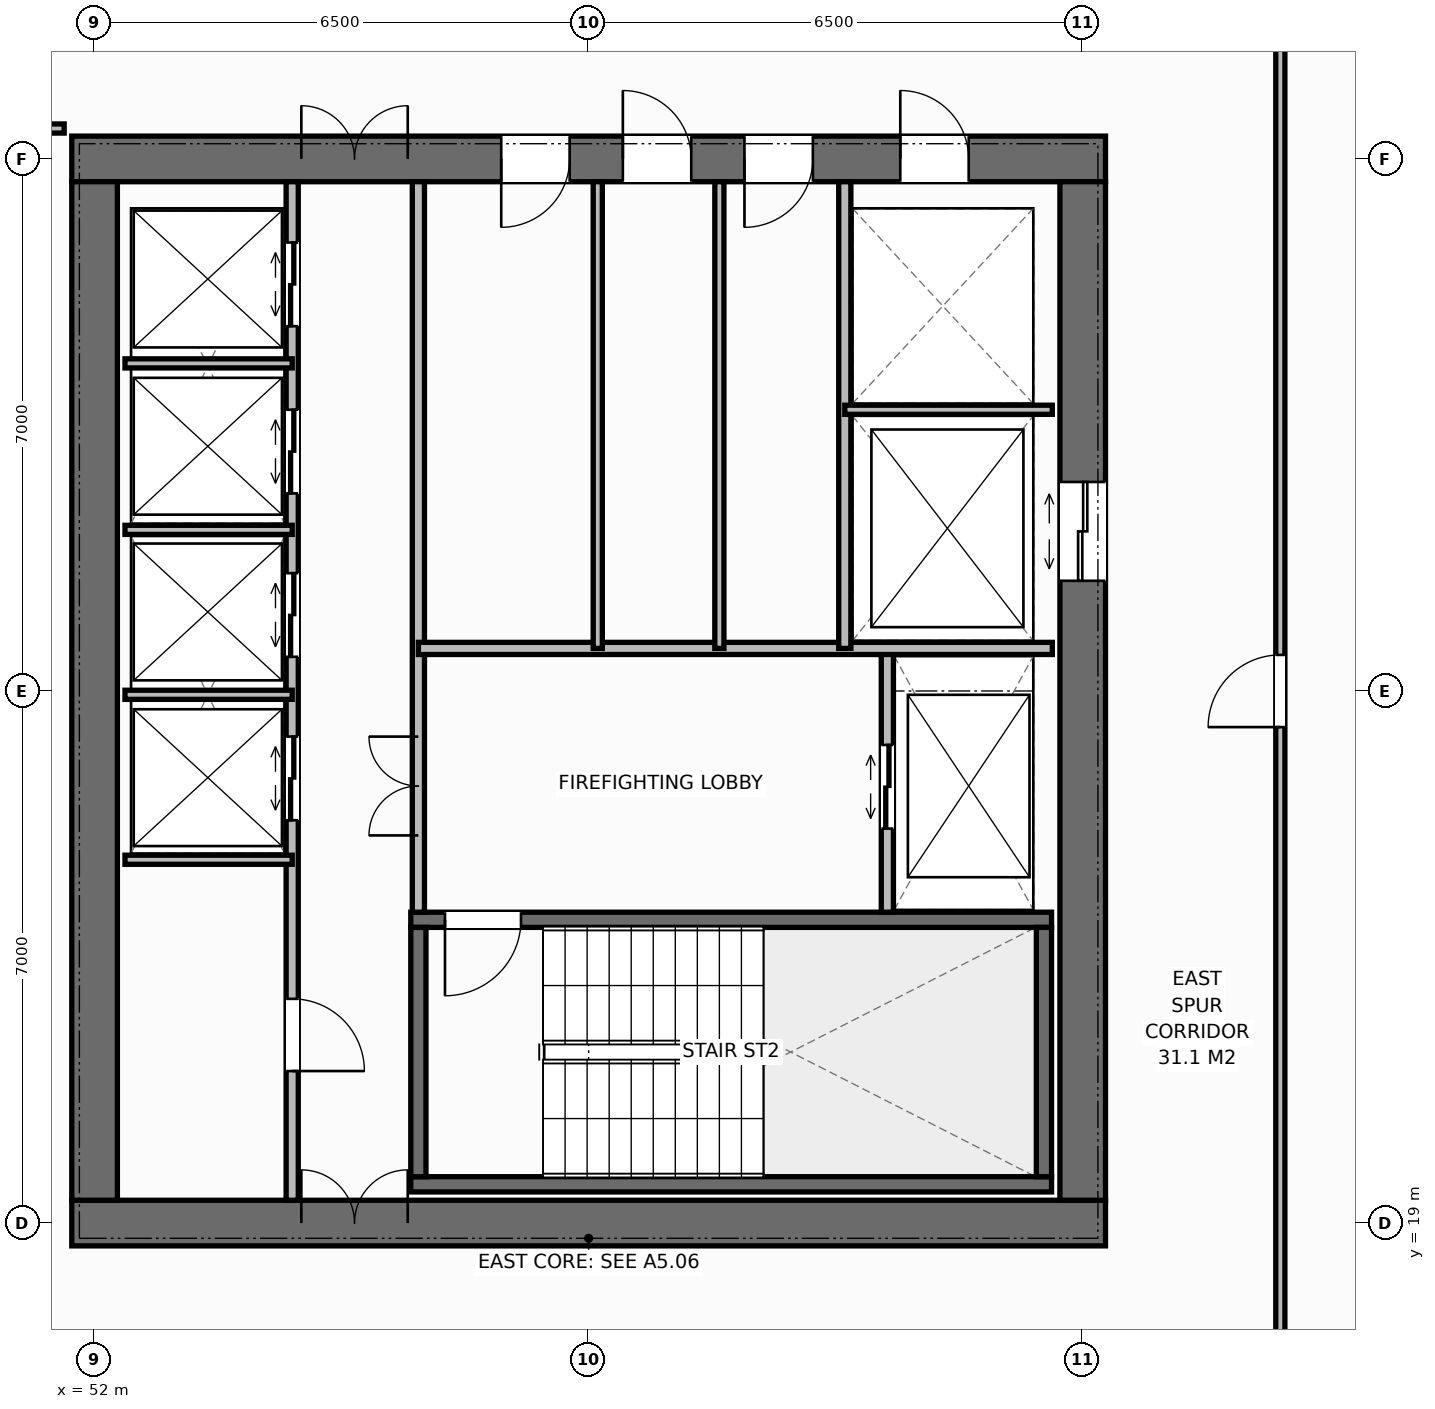
"""IFC4 building model, lengths in metres.
Left out: names, types, materials, properties, quantities, classifications, styles, units other than length and angle.
Written with IfcOpenShell. Run it as: python <this file> out.ifc"""

import sys

from ifc_helpers import new_model, si_unit, direction, frame, frame_2d, origin, place, context, subcontext, project, spatial, rectangle, extrude, element, fill, save


model = new_model("IFC4")
c1 = context("Model", 3, precision=1e-05, world=origin(), true_north=direction((0.0, 1.0)))
c2 = subcontext(c1, "Body", "Model", "MODEL_VIEW")
j1 = project(units=[si_unit("LENGTHUNIT", "METRE"), si_unit("PLANEANGLEUNIT", "RADIAN")], contexts=[c1])
p1 = place(None, origin())
s1 = spatial("IfcSite", under=j1, at=p1, CompositionType="ELEMENT")
p2 = place(p1, origin())
s2 = spatial("IfcBuilding", under=s1, at=p2, CompositionType="ELEMENT")
p3 = place(p2, frame((0.0, 0.0, 144.2)))
s3 = spatial("IfcBuildingStorey", under=s2, at=p3, CompositionType="ELEMENT", Elevation=144.2)
p4 = place(p3, frame((51.7, 19.0, 0.0), z_axis=(0.0, 0.0, 1.0), x_axis=(1.0, 0.0, 0.0)))
e1 = element("IfcWall", 1, at=p4, inside=s3, PredefinedType="SHEAR", context=c2, shape_type="SweptSolid", body=[
    extrude(rectangle(XDim=13.6, YDim=0.6, at=frame_2d((6.8, 0.0))), origin(), (0.0, 0.0, 1.0), 3.8),
])
p5 = place(p4, frame((3.02, 0.0, 0.0)))
e2 = element("IfcOpeningElement", 2, at=p5, cuts=e1, PredefinedType="OPENING", context=c2, shape_type="SweptSolid", body=[
    extrude(rectangle(XDim=1.4, YDim=2.2, at=frame_2d((0.7, 1.1))), frame((0.0, 0.31, 0.0), z_axis=(0.0, -1.0, 0.0), x_axis=(1.0, 0.0, 0.0)), (0.0, 0.0, 1.0), 0.62),
])
p6 = place(p3, frame((51.7, 33.0, 0.0), z_axis=(0.0, 0.0, 1.0), x_axis=(1.0, 0.0, 0.0)))
e3 = element("IfcWall", 3, at=p6, inside=s3, PredefinedType="SHEAR", context=c2, shape_type="SweptSolid", body=[
    extrude(rectangle(XDim=13.6, YDim=0.6, at=frame_2d((6.8, 0.0))), origin(), (0.0, 0.0, 1.0), 3.8),
])
p7 = place(p6, frame((3.02, 0.0, 0.0)))
e4 = element("IfcOpeningElement", 4, at=p7, cuts=e3, PredefinedType="OPENING", context=c2, shape_type="SweptSolid", body=[
    extrude(rectangle(XDim=1.4, YDim=2.2, at=frame_2d((0.7, 1.1))), frame((0.0, 0.31, 0.0), z_axis=(0.0, -1.0, 0.0), x_axis=(1.0, 0.0, 0.0)), (0.0, 0.0, 1.0), 0.62),
])
p8 = place(p6, frame((10.9, 0.0, 0.0)))
e5 = element("IfcOpeningElement", 5, at=p8, cuts=e3, PredefinedType="OPENING", context=c2, shape_type="SweptSolid", body=[
    extrude(rectangle(XDim=0.9, YDim=2.15, at=frame_2d((0.45, 1.075))), frame((0.0, 0.31, 0.0), z_axis=(0.0, -1.0, 0.0), x_axis=(1.0, 0.0, 0.0)), (0.0, 0.0, 1.0), 0.62),
])
p9 = place(p6, frame((5.65, 0.0, 0.0)))
e6 = element("IfcOpeningElement", 6, at=p9, cuts=e3, PredefinedType="OPENING", context=c2, shape_type="SweptSolid", body=[
    extrude(rectangle(XDim=0.9, YDim=2.15, at=frame_2d((0.45, 1.075))), frame((0.0, 0.31, 0.0), z_axis=(0.0, -1.0, 0.0), x_axis=(1.0, 0.0, 0.0)), (0.0, 0.0, 1.0), 0.62),
])
p10 = place(p6, frame((7.25, 0.0, 0.0)))
e7 = element("IfcOpeningElement", 7, at=p10, cuts=e3, PredefinedType="OPENING", context=c2, shape_type="SweptSolid", body=[
    extrude(rectangle(XDim=0.9, YDim=2.15, at=frame_2d((0.45, 1.075))), frame((0.0, 0.31, 0.0), z_axis=(0.0, -1.0, 0.0), x_axis=(1.0, 0.0, 0.0)), (0.0, 0.0, 1.0), 0.62),
])
p11 = place(p6, frame((8.85, 0.0, 0.0)))
e8 = element("IfcOpeningElement", 8, at=p11, cuts=e3, PredefinedType="OPENING", context=c2, shape_type="SweptSolid", body=[
    extrude(rectangle(XDim=0.9, YDim=2.15, at=frame_2d((0.45, 1.075))), frame((0.0, 0.31, 0.0), z_axis=(0.0, -1.0, 0.0), x_axis=(1.0, 0.0, 0.0)), (0.0, 0.0, 1.0), 0.62),
])
p12 = place(p3, frame((52.0, 19.3, 0.0), z_axis=(0.0, 0.0, 1.0), x_axis=(0.0, 1.0, 0.0)))
e9 = element("IfcWall", 9, at=p12, inside=s3, PredefinedType="SHEAR", context=c2, shape_type="SweptSolid", body=[
    extrude(rectangle(XDim=13.4, YDim=0.6, at=frame_2d((6.7, 0.0))), origin(), (0.0, 0.0, 1.0), 3.8),
])
p13 = place(p3, frame((65.0, 19.3, 0.0), z_axis=(0.0, 0.0, 1.0), x_axis=(0.0, 1.0, 0.0)))
e10 = element("IfcWall", 10, at=p13, inside=s3, PredefinedType="SHEAR", context=c2, shape_type="SweptSolid", body=[
    extrude(rectangle(XDim=13.4, YDim=0.6, at=frame_2d((6.7, 0.0))), origin(), (0.0, 0.0, 1.0), 3.8),
])
p14 = place(p13, frame((8.15, 0.0, 0.0)))
e11 = element("IfcOpeningElement", 11, at=p14, cuts=e10, PredefinedType="OPENING", context=c2, shape_type="SweptSolid", body=[
    extrude(rectangle(XDim=1.3, YDim=2.2, at=frame_2d((0.65, 1.1))), frame((0.0, 0.31, 0.0), z_axis=(0.0, -1.0, 0.0), x_axis=(1.0, 0.0, 0.0)), (0.0, 0.0, 1.0), 0.62),
])
p15 = place(p3, frame((56.16, 19.51, 0.0), z_axis=(0.0, 0.0, 1.0), x_axis=(1.0, 0.0, 0.0)))
e12 = element("IfcWall", 12, at=p15, inside=s3, PredefinedType="SHEAR", context=c2, shape_type="SweptSolid", body=[
    extrude(rectangle(XDim=8.43, YDim=0.2, at=frame_2d((4.215, 0.0))), origin(), (0.0, 0.0, 1.0), 3.8),
])
p16 = place(p3, frame((56.16, 22.99, 0.0), z_axis=(0.0, 0.0, 1.0), x_axis=(1.0, 0.0, 0.0)))
e13 = element("IfcWall", 13, at=p16, inside=s3, PredefinedType="SHEAR", context=c2, shape_type="SweptSolid", body=[
    extrude(rectangle(XDim=8.43, YDim=0.2, at=frame_2d((4.215, 0.0))), origin(), (0.0, 0.0, 1.0), 3.8),
])
p17 = place(p16, frame((0.45, 0.0, 0.0)))
e14 = element("IfcOpeningElement", 14, at=p17, cuts=e13, PredefinedType="OPENING", context=c2, shape_type="SweptSolid", body=[
    extrude(rectangle(XDim=1.0, YDim=2.15, at=frame_2d((0.5, 1.075))), frame((0.0, 0.11, 0.0), z_axis=(0.0, -1.0, 0.0), x_axis=(1.0, 0.0, 0.0)), (0.0, 0.0, 1.0), 0.22),
])
for number, where, z_axis, x_axis in (
    (15, (56.26, 19.61, 0.0), (0.0, 0.0, 1.0), (0.0, 1.0, 0.0)),
    (16, (64.49, 19.61, 0.0), (0.0, 0.0, 1.0), (0.0, 1.0, 0.0)),
):
    element("IfcWall", number, at=place(p3, frame(where, z_axis=z_axis, x_axis=x_axis)), inside=s3, PredefinedType="SHEAR", context=c2, shape_type="SweptSolid", body=[
        extrude(rectangle(XDim=3.28, YDim=0.2, at=frame_2d((1.64, 0.0))), origin(), (0.0, 0.0, 1.0), 3.8),
    ])
p18 = place(p3, frame((54.6, 19.3, 0.0), z_axis=(0.0, 0.0, 1.0), x_axis=(0.0, 1.0, 0.0)))
e17 = element("IfcWall", 17, at=p18, inside=s3, PredefinedType="STANDARD", context=c2, shape_type="SweptSolid", body=[
    extrude(rectangle(XDim=13.4, YDim=0.16, at=frame_2d((6.7, 0.0))), origin(), (0.0, 0.0, 1.0), 3.572),
])
p19 = place(p18, frame((1.7, 0.0, 0.0)))
e18 = element("IfcOpeningElement", 18, at=p19, cuts=e17, PredefinedType="OPENING", context=c2, shape_type="SweptSolid", body=[
    extrude(rectangle(XDim=0.95, YDim=2.15, at=frame_2d((0.475, 1.075))), frame((0.0, 0.09, 0.0), z_axis=(0.0, -1.0, 0.0), x_axis=(1.0, 0.0, 0.0)), (0.0, 0.0, 1.0), 0.18),
])
p20 = place(p18, frame((5.0, 0.0, 0.0)))
e19 = element("IfcOpeningElement", 19, at=p20, cuts=e17, PredefinedType="OPENING", context=c2, shape_type="SweptSolid", body=[
    extrude(rectangle(XDim=1.1, YDim=2.2, at=frame_2d((0.55, 1.1))), frame((0.0, 0.09, 0.0), z_axis=(0.0, -1.0, 0.0), x_axis=(1.0, 0.0, 0.0)), (0.0, 0.0, 1.0), 0.18),
])
p21 = place(p18, frame((7.15, 0.0, 0.0)))
e20 = element("IfcOpeningElement", 20, at=p21, cuts=e17, PredefinedType="OPENING", context=c2, shape_type="SweptSolid", body=[
    extrude(rectangle(XDim=1.1, YDim=2.2, at=frame_2d((0.55, 1.1))), frame((0.0, 0.09, 0.0), z_axis=(0.0, -1.0, 0.0), x_axis=(1.0, 0.0, 0.0)), (0.0, 0.0, 1.0), 0.18),
])
p22 = place(p18, frame((9.3, 0.0, 0.0)))
e21 = element("IfcOpeningElement", 21, at=p22, cuts=e17, PredefinedType="OPENING", context=c2, shape_type="SweptSolid", body=[
    extrude(rectangle(XDim=1.1, YDim=2.2, at=frame_2d((0.55, 1.1))), frame((0.0, 0.09, 0.0), z_axis=(0.0, -1.0, 0.0), x_axis=(1.0, 0.0, 0.0)), (0.0, 0.0, 1.0), 0.18),
])
p23 = place(p18, frame((11.5, 0.0, 0.0)))
e22 = element("IfcOpeningElement", 22, at=p23, cuts=e17, PredefinedType="OPENING", context=c2, shape_type="SweptSolid", body=[
    extrude(rectangle(XDim=1.1, YDim=2.2, at=frame_2d((0.55, 1.1))), frame((0.0, 0.09, 0.0), z_axis=(0.0, -1.0, 0.0), x_axis=(1.0, 0.0, 0.0)), (0.0, 0.0, 1.0), 0.18),
])
p24 = place(p3, frame((56.26, 23.09, 0.0), z_axis=(0.0, 0.0, 1.0), x_axis=(0.0, 1.0, 0.0)))
e23 = element("IfcWall", 23, at=p24, inside=s3, PredefinedType="STANDARD", context=c2, shape_type="SweptSolid", body=[
    extrude(rectangle(XDim=9.61, YDim=0.16, at=frame_2d((4.805, 0.0))), origin(), (0.0, 0.0, 1.0), 3.572),
])
p25 = place(p24, frame((1.01, 0.0, 0.0)))
e24 = element("IfcOpeningElement", 24, at=p25, cuts=e23, PredefinedType="OPENING", context=c2, shape_type="SweptSolid", body=[
    extrude(rectangle(XDim=1.3, YDim=2.2, at=frame_2d((0.65, 1.1))), frame((0.0, 0.09, 0.0), z_axis=(0.0, -1.0, 0.0), x_axis=(1.0, 0.0, 0.0)), (0.0, 0.0, 1.0), 0.18),
])
for number, where, z_axis, x_axis in (
    (25, (52.4, 23.78, 0.0), (0.0, 0.0, 1.0), (1.0, 0.0, 0.0)),
    (26, (52.4, 25.95, 0.0), (0.0, 0.0, 1.0), (1.0, 0.0, 0.0)),
    (27, (52.4, 28.12, 0.0), (0.0, 0.0, 1.0), (1.0, 0.0, 0.0)),
    (28, (52.4, 30.31, 0.0), (0.0, 0.0, 1.0), (1.0, 0.0, 0.0)),
):
    element("IfcWall", number, at=place(p3, frame(where, z_axis=z_axis, x_axis=x_axis)), inside=s3, PredefinedType="PARTITIONING", context=c2, shape_type="SweptSolid", body=[
        extrude(rectangle(XDim=2.2, YDim=0.12, at=frame_2d((1.1, 0.0))), origin(), (0.0, 0.0, 1.0), 3.572),
    ])
p26 = place(p3, frame((62.43, 23.09, 0.0), z_axis=(0.0, 0.0, 1.0), x_axis=(0.0, 1.0, 0.0)))
e29 = element("IfcWall", 29, at=p26, inside=s3, PredefinedType="STANDARD", context=c2, shape_type="SweptSolid", body=[
    extrude(rectangle(XDim=3.47, YDim=0.16, at=frame_2d((1.735, 0.0))), origin(), (0.0, 0.0, 1.0), 3.572),
])
p27 = place(p26, frame((1.1, 0.0, 0.0)))
e30 = element("IfcOpeningElement", 30, at=p27, cuts=e29, PredefinedType="OPENING", context=c2, shape_type="SweptSolid", body=[
    extrude(rectangle(XDim=1.1, YDim=2.2, at=frame_2d((0.55, 1.1))), frame((0.0, 0.09, 0.0), z_axis=(0.0, -1.0, 0.0), x_axis=(1.0, 0.0, 0.0)), (0.0, 0.0, 1.0), 0.18),
])
p28 = place(p3, frame((56.26, 26.56, 0.0), z_axis=(0.0, 0.0, 1.0), x_axis=(1.0, 0.0, 0.0)))
e31 = element("IfcWall", 31, at=p28, inside=s3, PredefinedType="STANDARD", context=c2, shape_type="SweptSolid", body=[
    extrude(rectangle(XDim=8.34, YDim=0.16, at=frame_2d((4.17, 0.0))), origin(), (0.0, 0.0, 1.0), 3.572),
])
p29 = place(p3, frame((61.87, 26.56, 0.0), z_axis=(0.0, 0.0, 1.0), x_axis=(0.0, 1.0, 0.0)))
e32 = element("IfcWall", 32, at=p29, inside=s3, PredefinedType="STANDARD", context=c2, shape_type="SweptSolid", body=[
    extrude(rectangle(XDim=6.14, YDim=0.16, at=frame_2d((3.07, 0.0))), origin(), (0.0, 0.0, 1.0), 3.572),
])
p30 = place(p3, frame((61.87, 29.7, 0.0), z_axis=(0.0, 0.0, 1.0), x_axis=(1.0, 0.0, 0.0)))
e33 = element("IfcWall", 33, at=p30, inside=s3, PredefinedType="PARTITIONING", context=c2, shape_type="SweptSolid", body=[
    extrude(rectangle(XDim=2.73, YDim=0.12, at=frame_2d((1.365, 0.0))), origin(), (0.0, 0.0, 1.0), 3.572),
])
for number, where, z_axis, x_axis in (
    (34, (58.62, 26.56, 0.0), (0.0, 0.0, 1.0), (0.0, 1.0, 0.0)),
    (35, (60.22, 26.56, 0.0), (0.0, 0.0, 1.0), (0.0, 1.0, 0.0)),
):
    element("IfcWall", number, at=place(p3, frame(where, z_axis=z_axis, x_axis=x_axis)), inside=s3, PredefinedType="PARTITIONING", context=c2, shape_type="SweptSolid", body=[
        extrude(rectangle(XDim=6.14, YDim=0.12, at=frame_2d((3.07, 0.0))), origin(), (0.0, 0.0, 1.0), 3.572),
    ])
p31 = place(p3, frame((48.0, 33.4, 0.0), z_axis=(0.0, 0.0, 1.0), x_axis=(1.0, 0.0, 0.0)))
e36 = element("IfcWall", 36, at=p31, inside=s3, PredefinedType="PARTITIONING", context=c2, shape_type="SweptSolid", body=[
    extrude(rectangle(XDim=3.6, YDim=0.12, at=frame_2d((1.8, 0.0))), origin(), (0.0, 0.0, 1.0), 3.572),
])
p32 = place(p31, frame((1.1, 0.0, 0.0)))
e37 = element("IfcOpeningElement", 37, at=p32, cuts=e36, PredefinedType="OPENING", context=c2, shape_type="SweptSolid", body=[
    extrude(rectangle(XDim=0.95, YDim=2.15, at=frame_2d((0.475, 1.075))), frame((0.0, 0.07, 0.0), z_axis=(0.0, -1.0, 0.0), x_axis=(1.0, 0.0, 0.0)), (0.0, 0.0, 1.0), 0.14),
])
p33 = place(p3, frame((67.6, 16.5, 0.0), z_axis=(0.0, 0.0, 1.0), x_axis=(0.0, 1.0, 0.0)))
e38 = element("IfcWall", 38, at=p33, inside=s3, PredefinedType="PARTITIONING", context=c2, shape_type="SweptSolid", body=[
    extrude(rectangle(XDim=19.0, YDim=0.12, at=frame_2d((9.5, 0.0))), origin(), (0.0, 0.0, 1.0), 3.572),
])
p34 = place(p33, frame((9.025, 0.0, 0.0)))
e39 = element("IfcOpeningElement", 39, at=p34, cuts=e38, PredefinedType="OPENING", context=c2, shape_type="SweptSolid", body=[
    extrude(rectangle(XDim=0.95, YDim=2.15, at=frame_2d((0.475, 1.075))), frame((0.0, 0.07, 0.0), z_axis=(0.0, -1.0, 0.0), x_axis=(1.0, 0.0, 0.0)), (0.0, 0.0, 1.0), 0.14),
])
p35 = place(p5, origin())
e40 = element("IfcDoor", 40, at=p35, inside=s3, OperationType="DOUBLE_DOOR_SINGLE_SWING", PredefinedType="DOOR", context=c2, shape_type="SweptSolid", body=[
    extrude(rectangle(XDim=1.4, YDim=2.2, at=frame_2d((0.7, 1.1))), frame((0.0, 0.075, 0.0), z_axis=(0.0, -1.0, 0.0), x_axis=(1.0, 0.0, 0.0)), (0.0, 0.0, 1.0), 0.05),
])
fill(e2, e40)
p36 = place(p7, origin())
e41 = element("IfcDoor", 41, at=p36, inside=s3, OperationType="DOUBLE_DOOR_SINGLE_SWING", PredefinedType="DOOR", context=c2, shape_type="SweptSolid", body=[
    extrude(rectangle(XDim=1.4, YDim=2.2, at=frame_2d((0.7, 1.1))), frame((0.0, -0.025, 0.0), z_axis=(0.0, -1.0, 0.0), x_axis=(1.0, 0.0, 0.0)), (0.0, 0.0, 1.0), 0.05),
])
fill(e4, e41)
p37 = place(p19, origin())
e42 = element("IfcDoor", 42, at=p37, inside=s3, OperationType="SINGLE_SWING_RIGHT", PredefinedType="DOOR", context=c2, shape_type="SweptSolid", body=[
    extrude(rectangle(XDim=0.95, YDim=2.15, at=frame_2d((0.475, 1.075))), frame((0.0, 0.025, 0.0), z_axis=(0.0, -1.0, 0.0), x_axis=(1.0, 0.0, 0.0)), (0.0, 0.0, 1.0), 0.05),
])
fill(e18, e42)
p38 = place(p20, origin())
e43 = element("IfcDoor", 43, at=p38, inside=s3, OperationType="DOUBLE_DOOR_SLIDING", PredefinedType="DOOR", context=c2, shape_type="SweptSolid", body=[
    extrude(rectangle(XDim=1.1, YDim=2.2, at=frame_2d((0.55, 1.1))), frame((0.0, 0.025, 0.0), z_axis=(0.0, -1.0, 0.0), x_axis=(1.0, 0.0, 0.0)), (0.0, 0.0, 1.0), 0.05),
])
fill(e19, e43)
p39 = place(p21, origin())
e44 = element("IfcDoor", 44, at=p39, inside=s3, OperationType="DOUBLE_DOOR_SLIDING", PredefinedType="DOOR", context=c2, shape_type="SweptSolid", body=[
    extrude(rectangle(XDim=1.1, YDim=2.2, at=frame_2d((0.55, 1.1))), frame((0.0, 0.025, 0.0), z_axis=(0.0, -1.0, 0.0), x_axis=(1.0, 0.0, 0.0)), (0.0, 0.0, 1.0), 0.05),
])
fill(e20, e44)
p40 = place(p22, origin())
e45 = element("IfcDoor", 45, at=p40, inside=s3, OperationType="DOUBLE_DOOR_SLIDING", PredefinedType="DOOR", context=c2, shape_type="SweptSolid", body=[
    extrude(rectangle(XDim=1.1, YDim=2.2, at=frame_2d((0.55, 1.1))), frame((0.0, 0.025, 0.0), z_axis=(0.0, -1.0, 0.0), x_axis=(1.0, 0.0, 0.0)), (0.0, 0.0, 1.0), 0.05),
])
fill(e21, e45)
p41 = place(p23, origin())
e46 = element("IfcDoor", 46, at=p41, inside=s3, OperationType="DOUBLE_DOOR_SLIDING", PredefinedType="DOOR", context=c2, shape_type="SweptSolid", body=[
    extrude(rectangle(XDim=1.1, YDim=2.2, at=frame_2d((0.55, 1.1))), frame((0.0, 0.025, 0.0), z_axis=(0.0, -1.0, 0.0), x_axis=(1.0, 0.0, 0.0)), (0.0, 0.0, 1.0), 0.05),
])
fill(e22, e46)
p42 = place(p17, origin())
e47 = element("IfcDoor", 47, at=p42, inside=s3, OperationType="SINGLE_SWING_RIGHT", PredefinedType="DOOR", context=c2, shape_type="SweptSolid", body=[
    extrude(rectangle(XDim=1.0, YDim=2.15, at=frame_2d((0.5, 1.075))), frame((0.0, 0.025, 0.0), z_axis=(0.0, -1.0, 0.0), x_axis=(1.0, 0.0, 0.0)), (0.0, 0.0, 1.0), 0.05),
])
fill(e14, e47)
p43 = place(p27, origin())
e48 = element("IfcDoor", 48, at=p43, inside=s3, OperationType="DOUBLE_DOOR_SLIDING", PredefinedType="DOOR", context=c2, shape_type="SweptSolid", body=[
    extrude(rectangle(XDim=1.1, YDim=2.2, at=frame_2d((0.55, 1.1))), frame((0.0, 0.025, 0.0), z_axis=(0.0, -1.0, 0.0), x_axis=(1.0, 0.0, 0.0)), (0.0, 0.0, 1.0), 0.05),
])
fill(e30, e48)
p44 = place(p25, origin())
e49 = element("IfcDoor", 49, at=p44, inside=s3, OperationType="DOUBLE_DOOR_SINGLE_SWING", PredefinedType="DOOR", context=c2, shape_type="SweptSolid", body=[
    extrude(rectangle(XDim=1.3, YDim=2.2, at=frame_2d((0.65, 1.1))), frame((0.0, 0.025, 0.0), z_axis=(0.0, -1.0, 0.0), x_axis=(1.0, 0.0, 0.0)), (0.0, 0.0, 1.0), 0.05),
])
fill(e24, e49)
p45 = place(p14, origin())
e50 = element("IfcDoor", 50, at=p45, inside=s3, OperationType="DOUBLE_DOOR_SLIDING", PredefinedType="DOOR", context=c2, shape_type="SweptSolid", body=[
    extrude(rectangle(XDim=1.3, YDim=2.2, at=frame_2d((0.65, 1.1))), frame((0.0, 0.025, 0.0), z_axis=(0.0, -1.0, 0.0), x_axis=(1.0, 0.0, 0.0)), (0.0, 0.0, 1.0), 0.05),
])
fill(e11, e50)
p46 = place(p8, origin())
e51 = element("IfcDoor", 51, at=p46, inside=s3, OperationType="SINGLE_SWING_LEFT", PredefinedType="DOOR", context=c2, shape_type="SweptSolid", body=[
    extrude(rectangle(XDim=0.9, YDim=2.15, at=frame_2d((0.45, 1.075))), frame((0.0, -0.025, 0.0), z_axis=(0.0, -1.0, 0.0), x_axis=(1.0, 0.0, 0.0)), (0.0, 0.0, 1.0), 0.05),
])
fill(e5, e51)
p47 = place(p9, origin())
e52 = element("IfcDoor", 52, at=p47, inside=s3, OperationType="SINGLE_SWING_RIGHT", PredefinedType="DOOR", context=c2, shape_type="SweptSolid", body=[
    extrude(rectangle(XDim=0.9, YDim=2.15, at=frame_2d((0.45, 1.075))), frame((0.0, -0.025, 0.0), z_axis=(0.0, -1.0, 0.0), x_axis=(1.0, 0.0, 0.0)), (0.0, 0.0, 1.0), 0.05),
])
fill(e6, e52)
p48 = place(p10, origin())
e53 = element("IfcDoor", 53, at=p48, inside=s3, OperationType="SINGLE_SWING_LEFT", PredefinedType="DOOR", context=c2, shape_type="SweptSolid", body=[
    extrude(rectangle(XDim=0.9, YDim=2.15, at=frame_2d((0.45, 1.075))), frame((0.0, -0.025, 0.0), z_axis=(0.0, -1.0, 0.0), x_axis=(1.0, 0.0, 0.0)), (0.0, 0.0, 1.0), 0.05),
])
fill(e7, e53)
p49 = place(p11, origin())
e54 = element("IfcDoor", 54, at=p49, inside=s3, OperationType="SINGLE_SWING_RIGHT", PredefinedType="DOOR", context=c2, shape_type="SweptSolid", body=[
    extrude(rectangle(XDim=0.9, YDim=2.15, at=frame_2d((0.45, 1.075))), frame((0.0, -0.025, 0.0), z_axis=(0.0, -1.0, 0.0), x_axis=(1.0, 0.0, 0.0)), (0.0, 0.0, 1.0), 0.05),
])
fill(e8, e54)
p50 = place(p34, origin())
e55 = element("IfcDoor", 55, at=p50, inside=s3, OperationType="SINGLE_SWING_LEFT", PredefinedType="DOOR", context=c2, shape_type="SweptSolid", body=[
    extrude(rectangle(XDim=0.95, YDim=2.15, at=frame_2d((0.475, 1.075))), frame((0.0, 0.025, 0.0), z_axis=(0.0, -1.0, 0.0), x_axis=(1.0, 0.0, 0.0)), (0.0, 0.0, 1.0), 0.05),
])
fill(e39, e55)
save(model, sys.argv[1])
